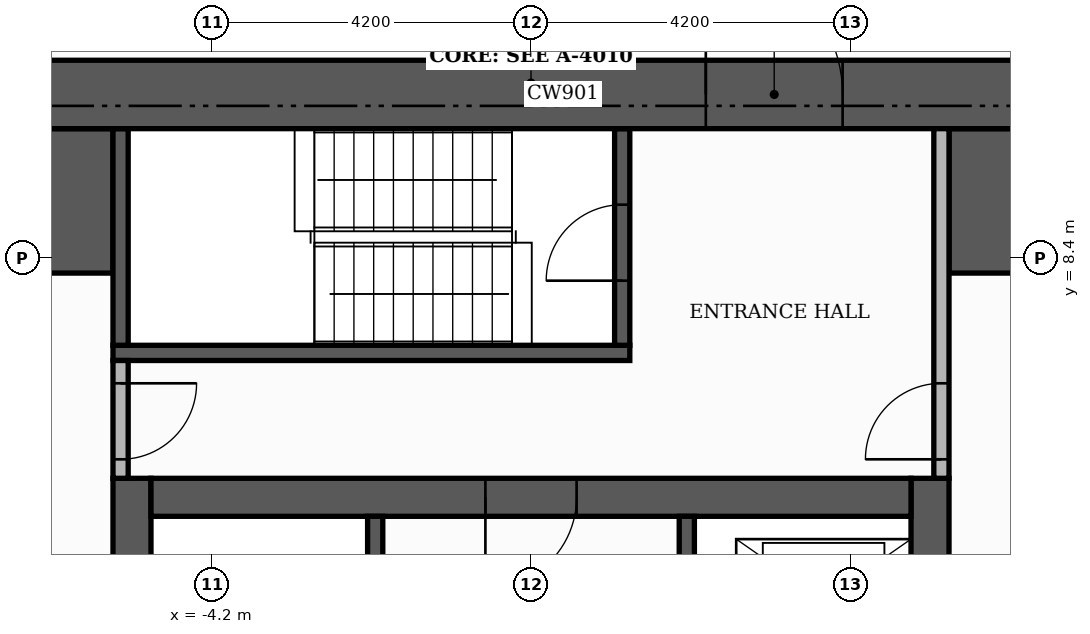
"""IFC4 building model, lengths in metres.
Left out: names, types, materials, properties, quantities, classifications, styles, units other than length and angle.
Written with IfcOpenShell. Run it as: python <this file> out.ifc"""

import sys

from ifc_helpers import new_model, si_unit, direction, frame, frame_2d, origin, place, context, subcontext, project, spatial, rectangle, extrude, element, fill, save


model = new_model("IFC4")
c1 = context("Model", 3, precision=1e-05, world=origin(), true_north=direction((0.0, 1.0)))
c2 = subcontext(c1, "Body", "Model", "MODEL_VIEW")
j1 = project(units=[si_unit("LENGTHUNIT", "METRE"), si_unit("PLANEANGLEUNIT", "RADIAN")], contexts=[c1])
p1 = place(None, origin())
s1 = spatial("IfcSite", under=j1, at=p1, CompositionType="ELEMENT")
p2 = place(p1, origin())
s2 = spatial("IfcBuilding", under=s1, at=p2, CompositionType="ELEMENT")
p3 = place(p2, frame((0.0, 0.0, 50.4)))
s3 = spatial("IfcBuildingStorey", under=s2, at=p3, CompositionType="ELEMENT", Elevation=50.4)
for number, where, z_axis, x_axis in (
    (1, (-5.25, -5.0, 0.0), (0.0, 0.0, 1.0), (0.0, 1.0, 0.0)),
    (2, (5.25, -5.0, 0.0), (0.0, 0.0, 1.0), (0.0, 1.0, 0.0)),
):
    element("IfcWall", number, at=place(p3, frame(where, z_axis=z_axis, x_axis=x_axis)), inside=s3, PredefinedType="SHEAR", context=c2, shape_type="SweptSolid", body=[
        extrude(rectangle(XDim=10.5, YDim=0.5, at=frame_2d((5.25, 0.0))), origin(), (0.0, 0.0, 1.0), 3.48),
    ])
p4 = place(p3, frame((-5.0, 5.25, 0.0), z_axis=(0.0, 0.0, 1.0), x_axis=(1.0, 0.0, 0.0)))
e3 = element("IfcWall", 3, at=p4, inside=s3, PredefinedType="SHEAR", context=c2, shape_type="SweptSolid", body=[
    extrude(rectangle(XDim=10.0, YDim=0.5, at=frame_2d((5.0, 0.0))), origin(), (0.0, 0.0, 1.0), 3.48),
])
p5 = place(p4, frame((4.4, 0.0, 0.0)))
e4 = element("IfcOpeningElement", 4, at=p5, cuts=e3, PredefinedType="OPENING", context=c2, shape_type="SweptSolid", body=[
    extrude(rectangle(XDim=1.2, YDim=2.1, at=frame_2d((0.6, 1.05))), frame((0.0, 0.26, 0.0), z_axis=(0.0, -1.0, 0.0), x_axis=(1.0, 0.0, 0.0)), (0.0, 0.0, 1.0), 0.52),
])
for number, where, z_axis, x_axis in (
    (5, (-10.1, 9.15, 0.0), (0.0, 0.0, 1.0), (1.0, 0.0, 0.0)),
    (6, (5.5, 9.15, 0.0), (0.0, 0.0, 1.0), (1.0, 0.0, 0.0)),
):
    element("IfcWall", number, at=place(p3, frame(where, z_axis=z_axis, x_axis=x_axis)), inside=s3, PredefinedType="SHEAR", context=c2, shape_type="SweptSolid", body=[
        extrude(rectangle(XDim=4.6, YDim=1.9, at=frame_2d((2.3, 0.0))), origin(), (0.0, 0.0, 1.0), 3.48),
    ])
p6 = place(p3, frame((-2.05, -1.4, 0.0), z_axis=(0.0, 0.0, 1.0), x_axis=(0.0, 1.0, 0.0)))
e7 = element("IfcWall", 7, at=p6, inside=s3, PredefinedType="SHEAR", context=c2, shape_type="SweptSolid", body=[
    extrude(rectangle(XDim=6.4, YDim=0.2, at=frame_2d((3.2, 0.0))), origin(), (0.0, 0.0, 1.0), 3.48),
])
p7 = place(p6, frame((0.15, 0.0, 0.0)))
e8 = element("IfcOpeningElement", 8, at=p7, cuts=e7, PredefinedType="OPENING", context=c2, shape_type="SweptSolid", body=[
    extrude(rectangle(XDim=1.0, YDim=2.1, at=frame_2d((0.5, 1.05))), frame((0.0, 0.11, 0.0), z_axis=(0.0, -1.0, 0.0), x_axis=(1.0, 0.0, 0.0)), (0.0, 0.0, 1.0), 0.22),
])
p8 = place(p3, frame((-5.5, 7.15, 0.0), z_axis=(0.0, 0.0, 1.0), x_axis=(1.0, 0.0, 0.0)))
e9 = element("IfcWall", 9, at=p8, inside=s3, PredefinedType="SHEAR", context=c2, shape_type="SweptSolid", body=[
    extrude(rectangle(XDim=6.8, YDim=0.2, at=frame_2d((3.4, 0.0))), origin(), (0.0, 0.0, 1.0), 3.48),
])
p9 = place(p3, frame((-5.4, 7.25, 0.0), z_axis=(0.0, 0.0, 1.0), x_axis=(0.0, 1.0, 0.0)))
e10 = element("IfcWall", 10, at=p9, inside=s3, PredefinedType="SHEAR", context=c2, shape_type="SweptSolid", body=[
    extrude(rectangle(XDim=2.85, YDim=0.2, at=frame_2d((1.425, 0.0))), origin(), (0.0, 0.0, 1.0), 3.48),
])
p10 = place(p3, frame((1.2, 7.25, 0.0), z_axis=(0.0, 0.0, 1.0), x_axis=(0.0, 1.0, 0.0)))
e11 = element("IfcWall", 11, at=p10, inside=s3, PredefinedType="SHEAR", context=c2, shape_type="SweptSolid", body=[
    extrude(rectangle(XDim=2.85, YDim=0.2, at=frame_2d((1.425, 0.0))), origin(), (0.0, 0.0, 1.0), 3.48),
])
p11 = place(p10, frame((0.85, 0.0, 0.0)))
e12 = element("IfcOpeningElement", 12, at=p11, cuts=e11, PredefinedType="OPENING", context=c2, shape_type="SweptSolid", body=[
    extrude(rectangle(XDim=1.0, YDim=2.1, at=frame_2d((0.5, 1.05))), frame((0.0, 0.11, 0.0), z_axis=(0.0, -1.0, 0.0), x_axis=(1.0, 0.0, 0.0)), (0.0, 0.0, 1.0), 0.22),
])
p12 = place(p3, frame((2.05, 1.6, 0.0), z_axis=(0.0, 0.0, 1.0), x_axis=(0.0, 1.0, 0.0)))
e13 = element("IfcWall", 13, at=p12, inside=s3, PredefinedType="SHEAR", context=c2, shape_type="SweptSolid", body=[
    extrude(rectangle(XDim=3.4, YDim=0.2, at=frame_2d((1.7, 0.0))), origin(), (0.0, 0.0, 1.0), 3.48),
])
p13 = place(p12, frame((1.75, 0.0, 0.0)))
e14 = element("IfcOpeningElement", 14, at=p13, cuts=e13, PredefinedType="OPENING", context=c2, shape_type="SweptSolid", body=[
    extrude(rectangle(XDim=1.1, YDim=2.1, at=frame_2d((0.55, 1.05))), frame((0.0, 0.11, 0.0), z_axis=(0.0, -1.0, 0.0), x_axis=(1.0, 0.0, 0.0)), (0.0, 0.0, 1.0), 0.22),
])
p14 = place(p12, frame((0.15, 0.0, 0.0)))
e15 = element("IfcOpeningElement", 15, at=p14, cuts=e13, PredefinedType="OPENING", context=c2, shape_type="SweptSolid", body=[
    extrude(rectangle(XDim=0.8, YDim=2.1, at=frame_2d((0.4, 1.05))), frame((0.0, 0.11, 0.0), z_axis=(0.0, -1.0, 0.0), x_axis=(1.0, 0.0, 0.0)), (0.0, 0.0, 1.0), 0.22),
])
p15 = place(p3, frame((-11.0, 10.55, 0.0), z_axis=(0.0, 0.0, 1.0), x_axis=(1.0, 0.0, 0.0)))
e16 = element("IfcWall", 16, at=p15, inside=s3, PredefinedType="SHEAR", context=c2, shape_type="SweptSolid", body=[
    extrude(rectangle(XDim=22.0, YDim=0.9, at=frame_2d((11.0, 0.0))), origin(), (0.0, 0.0, 1.0), 3.48),
])
p16 = place(p15, frame((13.3, 0.0, 0.0)))
e17 = element("IfcOpeningElement", 17, at=p16, cuts=e16, PredefinedType="OPENING", context=c2, shape_type="SweptSolid", body=[
    extrude(rectangle(XDim=1.8, YDim=2.2, at=frame_2d((0.9, 1.1))), frame((0.0, 0.46, 0.0), z_axis=(0.0, -1.0, 0.0), x_axis=(1.0, 0.0, 0.0)), (0.0, 0.0, 1.0), 0.92),
])
p17 = place(p3, frame((-5.4, 5.5, 0.0), z_axis=(0.0, 0.0, 1.0), x_axis=(0.0, 1.0, 0.0)))
e18 = element("IfcWall", 18, at=p17, inside=s3, PredefinedType="PARTITIONING", context=c2, shape_type="SweptSolid", body=[
    extrude(rectangle(XDim=1.55, YDim=0.2, at=frame_2d((0.775, 0.0))), origin(), (0.0, 0.0, 1.0), 3.48),
])
p18 = place(p17, frame((0.25, 0.0, 0.0)))
e19 = element("IfcOpeningElement", 19, at=p18, cuts=e18, PredefinedType="OPENING", context=c2, shape_type="SweptSolid", body=[
    extrude(rectangle(XDim=1.0, YDim=2.1, at=frame_2d((0.5, 1.05))), frame((0.0, 0.11, 0.0), z_axis=(0.0, -1.0, 0.0), x_axis=(1.0, 0.0, 0.0)), (0.0, 0.0, 1.0), 0.22),
])
p19 = place(p3, frame((5.4, 5.5, 0.0), z_axis=(0.0, 0.0, 1.0), x_axis=(0.0, 1.0, 0.0)))
e20 = element("IfcWall", 20, at=p19, inside=s3, PredefinedType="PARTITIONING", context=c2, shape_type="SweptSolid", body=[
    extrude(rectangle(XDim=4.6, YDim=0.2, at=frame_2d((2.3, 0.0))), origin(), (0.0, 0.0, 1.0), 3.48),
])
p20 = place(p19, frame((0.25, 0.0, 0.0)))
e21 = element("IfcOpeningElement", 21, at=p20, cuts=e20, PredefinedType="OPENING", context=c2, shape_type="SweptSolid", body=[
    extrude(rectangle(XDim=1.0, YDim=2.1, at=frame_2d((0.5, 1.05))), frame((0.0, 0.11, 0.0), z_axis=(0.0, -1.0, 0.0), x_axis=(1.0, 0.0, 0.0)), (0.0, 0.0, 1.0), 0.22),
])
p21 = place(p5, frame((1.2, 0.0, 0.0), z_axis=(0.0, 0.0, 1.0), x_axis=(-1.0, 0.0, 0.0)))
e22 = element("IfcDoor", 22, at=p21, inside=s3, OperationType="SINGLE_SWING_LEFT", PredefinedType="DOOR", context=c2, shape_type="SweptSolid", body=[
    extrude(rectangle(XDim=1.2, YDim=2.1, at=frame_2d((0.6, 1.05))), frame((0.0, 0.025, 0.0), z_axis=(0.0, -1.0, 0.0), x_axis=(1.0, 0.0, 0.0)), (0.0, 0.0, 1.0), 0.05),
])
fill(e4, e22)
p22 = place(p11, origin())
e23 = element("IfcDoor", 23, at=p22, inside=s3, OperationType="SINGLE_SWING_LEFT", PredefinedType="DOOR", context=c2, shape_type="SweptSolid", body=[
    extrude(rectangle(XDim=1.0, YDim=2.1, at=frame_2d((0.5, 1.05))), frame((0.0, 0.025, 0.0), z_axis=(0.0, -1.0, 0.0), x_axis=(1.0, 0.0, 0.0)), (0.0, 0.0, 1.0), 0.05),
])
fill(e12, e23)
p23 = place(p18, frame((1.0, 0.0, 0.0), z_axis=(0.0, 0.0, 1.0), x_axis=(-1.0, 0.0, 0.0)))
e24 = element("IfcDoor", 24, at=p23, inside=s3, OperationType="SINGLE_SWING_RIGHT", PredefinedType="DOOR", context=c2, shape_type="SweptSolid", body=[
    extrude(rectangle(XDim=1.0, YDim=2.1, at=frame_2d((0.5, 1.05))), frame((0.0, 0.025, 0.0), z_axis=(0.0, -1.0, 0.0), x_axis=(1.0, 0.0, 0.0)), (0.0, 0.0, 1.0), 0.05),
])
fill(e19, e24)
p24 = place(p20, origin())
e25 = element("IfcDoor", 25, at=p24, inside=s3, OperationType="SINGLE_SWING_LEFT", PredefinedType="DOOR", context=c2, shape_type="SweptSolid", body=[
    extrude(rectangle(XDim=1.0, YDim=2.1, at=frame_2d((0.5, 1.05))), frame((0.0, 0.025, 0.0), z_axis=(0.0, -1.0, 0.0), x_axis=(1.0, 0.0, 0.0)), (0.0, 0.0, 1.0), 0.05),
])
fill(e21, e25)
p25 = place(p16, origin())
e26 = element("IfcDoor", 26, at=p25, inside=s3, OperationType="DOUBLE_DOOR_SINGLE_SWING", PredefinedType="DOOR", context=c2, shape_type="SweptSolid", body=[
    extrude(rectangle(XDim=1.8, YDim=2.2, at=frame_2d((0.9, 1.1))), frame((0.0, 0.025, 0.0), z_axis=(0.0, -1.0, 0.0), x_axis=(1.0, 0.0, 0.0)), (0.0, 0.0, 1.0), 0.05),
])
fill(e17, e26)
save(model, sys.argv[1])
